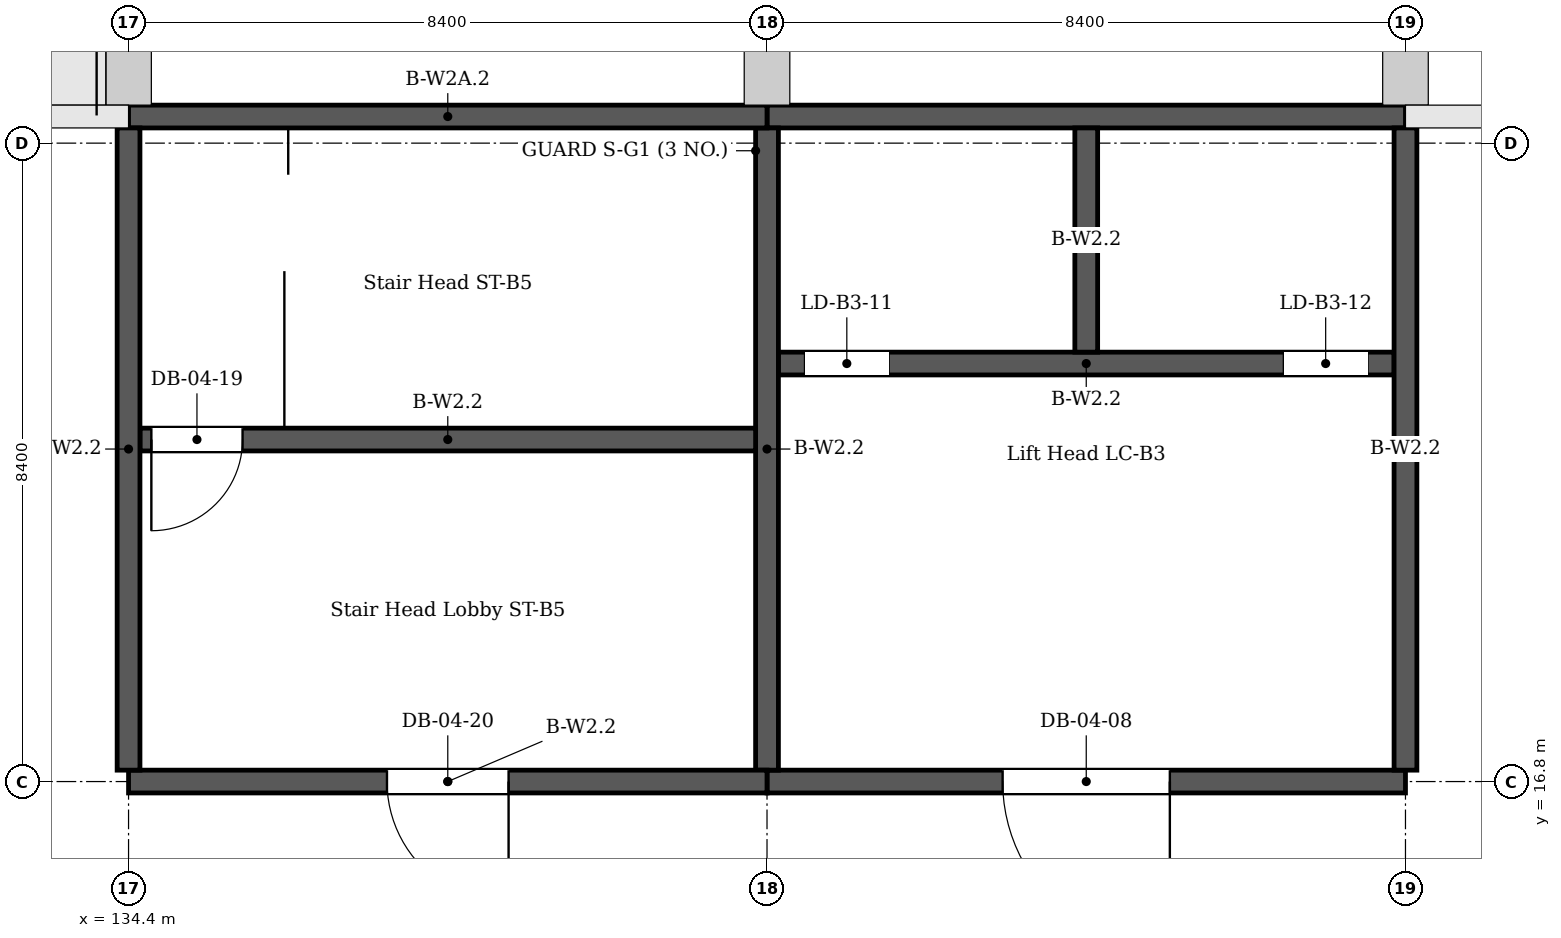
"""IFC4 building model, lengths in metres.
Left out: names, types, materials, properties, quantities, classifications, styles, units other than length and angle.
Written with IfcOpenShell. Run it as: python <this file> out.ifc"""

import sys

from ifc_helpers import new_model, si_unit, direction, frame, frame_2d, origin, place, context, subcontext, project, spatial, rectangle, extrude, element, fill, save


model = new_model("IFC4")
c1 = context("Model", 3, precision=1e-05, world=origin(), true_north=direction((0.0, 1.0)))
c2 = subcontext(c1, "Body", "Model", "MODEL_VIEW")
j1 = project(units=[si_unit("LENGTHUNIT", "METRE"), si_unit("PLANEANGLEUNIT", "RADIAN")], contexts=[c1])
p1 = place(None, origin())
s1 = spatial("IfcSite", under=j1, at=p1, CompositionType="ELEMENT")
p2 = place(p1, origin())
s2 = spatial("IfcBuilding", under=s1, at=p2, CompositionType="ELEMENT")
p3 = place(p2, frame((0.0, 0.0, 18.6)))
s3 = spatial("IfcBuildingStorey", under=s2, at=p3, CompositionType="ELEMENT", Elevation=18.6)
for number, where, z_axis, x_axis in (
    (1, (142.8, 16.95, 0.0), (0.0, 0.0, 1.0), (0.0, 1.0, 0.0)),
    (2, (151.2, 16.95, 0.0), (0.0, 0.0, 1.0), (0.0, 1.0, 0.0)),
):
    element("IfcWall", number, at=place(p3, frame(where, z_axis=z_axis, x_axis=x_axis)), inside=s3, PredefinedType="SHEAR", context=c2, shape_type="SweptSolid", body=[
        extrude(rectangle(XDim=8.45, YDim=0.3, at=frame_2d((4.225, 0.0))), origin(), (0.0, 0.0, 1.0), 3.89),
    ])
p4 = place(p3, frame((142.8, 16.8, 0.0), z_axis=(0.0, 0.0, 1.0), x_axis=(1.0, 0.0, 0.0)))
e3 = element("IfcWall", 3, at=p4, inside=s3, PredefinedType="SHEAR", context=c2, shape_type="SweptSolid", body=[
    extrude(rectangle(XDim=8.4, YDim=0.3, at=frame_2d((4.2, 0.0))), origin(), (0.0, 0.0, 1.0), 3.89),
])
p5 = place(p4, frame((3.1, 0.0, 0.0)))
e4 = element("IfcOpeningElement", 4, at=p5, cuts=e3, PredefinedType="OPENING", context=c2, shape_type="SweptSolid", body=[
    extrude(rectangle(XDim=2.2, YDim=2.6, at=frame_2d((1.1, 1.3))), frame((0.0, 0.16, 0.0), z_axis=(0.0, -1.0, 0.0), x_axis=(1.0, 0.0, 0.0)), (0.0, 0.0, 1.0), 0.32),
])
p6 = place(p3, frame((142.95, 22.3, 0.0), z_axis=(0.0, 0.0, 1.0), x_axis=(1.0, 0.0, 0.0)))
e5 = element("IfcWall", 5, at=p6, inside=s3, PredefinedType="SHEAR", context=c2, shape_type="SweptSolid", body=[
    extrude(rectangle(XDim=8.1, YDim=0.3, at=frame_2d((4.05, 0.0))), origin(), (0.0, 0.0, 1.0), 3.89),
])
p7 = place(p6, frame((0.35, 0.0, 0.0)))
e6 = element("IfcOpeningElement", 6, at=p7, cuts=e5, PredefinedType="OPENING", context=c2, shape_type="SweptSolid", body=[
    extrude(rectangle(XDim=1.1, YDim=2.2, at=frame_2d((0.55, 1.1))), frame((0.0, 0.16, 0.0), z_axis=(0.0, -1.0, 0.0), x_axis=(1.0, 0.0, 0.0)), (0.0, 0.0, 1.0), 0.32),
])
p8 = place(p6, frame((6.65, 0.0, 0.0)))
e7 = element("IfcOpeningElement", 7, at=p8, cuts=e5, PredefinedType="OPENING", context=c2, shape_type="SweptSolid", body=[
    extrude(rectangle(XDim=1.1, YDim=2.2, at=frame_2d((0.55, 1.1))), frame((0.0, 0.16, 0.0), z_axis=(0.0, -1.0, 0.0), x_axis=(1.0, 0.0, 0.0)), (0.0, 0.0, 1.0), 0.32),
])
p9 = place(p3, frame((142.8, 25.55, 0.0), z_axis=(0.0, 0.0, 1.0), x_axis=(1.0, 0.0, 0.0)))
e8 = element("IfcWall", 8, at=p9, inside=s3, PredefinedType="SHEAR", context=c2, shape_type="SweptSolid", body=[
    extrude(rectangle(XDim=8.4, YDim=0.3, at=frame_2d((4.2, 0.0))), origin(), (0.0, 0.0, 1.0), 3.89),
])
p10 = place(p3, frame((147.0, 22.45, 0.0), z_axis=(0.0, 0.0, 1.0), x_axis=(0.0, 1.0, 0.0)))
e9 = element("IfcWall", 9, at=p10, inside=s3, PredefinedType="SHEAR", context=c2, shape_type="SweptSolid", body=[
    extrude(rectangle(XDim=2.95, YDim=0.3, at=frame_2d((1.475, 0.0))), origin(), (0.0, 0.0, 1.0), 3.89),
])
p11 = place(p3, frame((134.4, 16.95, 0.0), z_axis=(0.0, 0.0, 1.0), x_axis=(0.0, 1.0, 0.0)))
e10 = element("IfcWall", 10, at=p11, inside=s3, PredefinedType="SHEAR", context=c2, shape_type="SweptSolid", body=[
    extrude(rectangle(XDim=8.45, YDim=0.3, at=frame_2d((4.225, 0.0))), origin(), (0.0, 0.0, 1.0), 3.89),
])
p12 = place(p3, frame((134.4, 16.8, 0.0), z_axis=(0.0, 0.0, 1.0), x_axis=(1.0, 0.0, 0.0)))
e11 = element("IfcWall", 11, at=p12, inside=s3, PredefinedType="SHEAR", context=c2, shape_type="SweptSolid", body=[
    extrude(rectangle(XDim=8.4, YDim=0.3, at=frame_2d((4.2, 0.0))), origin(), (0.0, 0.0, 1.0), 3.89),
])
p13 = place(p12, frame((3.4, 0.0, 0.0)))
e12 = element("IfcOpeningElement", 12, at=p13, cuts=e11, PredefinedType="OPENING", context=c2, shape_type="SweptSolid", body=[
    extrude(rectangle(XDim=1.6, YDim=2.4, at=frame_2d((0.8, 1.2))), frame((0.0, 0.16, 0.0), z_axis=(0.0, -1.0, 0.0), x_axis=(1.0, 0.0, 0.0)), (0.0, 0.0, 1.0), 0.32),
])
p14 = place(p3, frame((134.55, 21.3, 0.0), z_axis=(0.0, 0.0, 1.0), x_axis=(1.0, 0.0, 0.0)))
e13 = element("IfcWall", 13, at=p14, inside=s3, PredefinedType="SHEAR", context=c2, shape_type="SweptSolid", body=[
    extrude(rectangle(XDim=8.1, YDim=0.3, at=frame_2d((4.05, 0.0))), origin(), (0.0, 0.0, 1.0), 3.89),
])
p15 = place(p14, frame((0.15, 0.0, 0.0)))
e14 = element("IfcOpeningElement", 14, at=p15, cuts=e13, PredefinedType="OPENING", context=c2, shape_type="SweptSolid", body=[
    extrude(rectangle(XDim=1.2, YDim=2.1, at=frame_2d((0.6, 1.05))), frame((0.0, 0.16, 0.0), z_axis=(0.0, -1.0, 0.0), x_axis=(1.0, 0.0, 0.0)), (0.0, 0.0, 1.0), 0.32),
])
p16 = place(p3, frame((134.4, 25.55, 0.0), z_axis=(0.0, 0.0, 1.0), x_axis=(1.0, 0.0, 0.0)))
e15 = element("IfcWall", 15, at=p16, inside=s3, PredefinedType="SHEAR", context=c2, shape_type="SweptSolid", body=[
    extrude(rectangle(XDim=8.4, YDim=0.3, at=frame_2d((4.2, 0.0))), origin(), (0.0, 0.0, 1.0), 3.89),
])
p17 = place(p5, origin())
e16 = element("IfcDoor", 16, at=p17, inside=s3, OperationType="DOUBLE_DOOR_SINGLE_SWING", PredefinedType="DOOR", context=c2, shape_type="SweptSolid", body=[
    extrude(rectangle(XDim=2.2, YDim=2.6, at=frame_2d((1.1, 1.3))), frame((0.0, 0.025, 0.0), z_axis=(0.0, -1.0, 0.0), x_axis=(1.0, 0.0, 0.0)), (0.0, 0.0, 1.0), 0.05),
])
fill(e4, e16)
p18 = place(p7, origin())
e17 = element("IfcDoor", 17, at=p18, inside=s3, OperationType="SLIDING_TO_LEFT", PredefinedType="DOOR", context=c2, shape_type="SweptSolid", body=[
    extrude(rectangle(XDim=1.1, YDim=2.2, at=frame_2d((0.55, 1.1))), frame((0.0, 0.025, 0.0), z_axis=(0.0, -1.0, 0.0), x_axis=(1.0, 0.0, 0.0)), (0.0, 0.0, 1.0), 0.05),
])
fill(e6, e17)
p19 = place(p8, origin())
e18 = element("IfcDoor", 18, at=p19, inside=s3, OperationType="SLIDING_TO_LEFT", PredefinedType="DOOR", context=c2, shape_type="SweptSolid", body=[
    extrude(rectangle(XDim=1.1, YDim=2.2, at=frame_2d((0.55, 1.1))), frame((0.0, 0.025, 0.0), z_axis=(0.0, -1.0, 0.0), x_axis=(1.0, 0.0, 0.0)), (0.0, 0.0, 1.0), 0.05),
])
fill(e7, e18)
p20 = place(p15, origin())
e19 = element("IfcDoor", 19, at=p20, inside=s3, OperationType="SINGLE_SWING_LEFT", PredefinedType="DOOR", context=c2, shape_type="SweptSolid", body=[
    extrude(rectangle(XDim=1.2, YDim=2.1, at=frame_2d((0.6, 1.05))), frame((0.0, 0.025, 0.0), z_axis=(0.0, -1.0, 0.0), x_axis=(1.0, 0.0, 0.0)), (0.0, 0.0, 1.0), 0.05),
])
fill(e14, e19)
p21 = place(p13, origin())
e20 = element("IfcDoor", 20, at=p21, inside=s3, OperationType="DOUBLE_DOOR_SINGLE_SWING", PredefinedType="DOOR", context=c2, shape_type="SweptSolid", body=[
    extrude(rectangle(XDim=1.6, YDim=2.4, at=frame_2d((0.8, 1.2))), frame((0.0, 0.025, 0.0), z_axis=(0.0, -1.0, 0.0), x_axis=(1.0, 0.0, 0.0)), (0.0, 0.0, 1.0), 0.05),
])
fill(e12, e20)
save(model, sys.argv[1])
